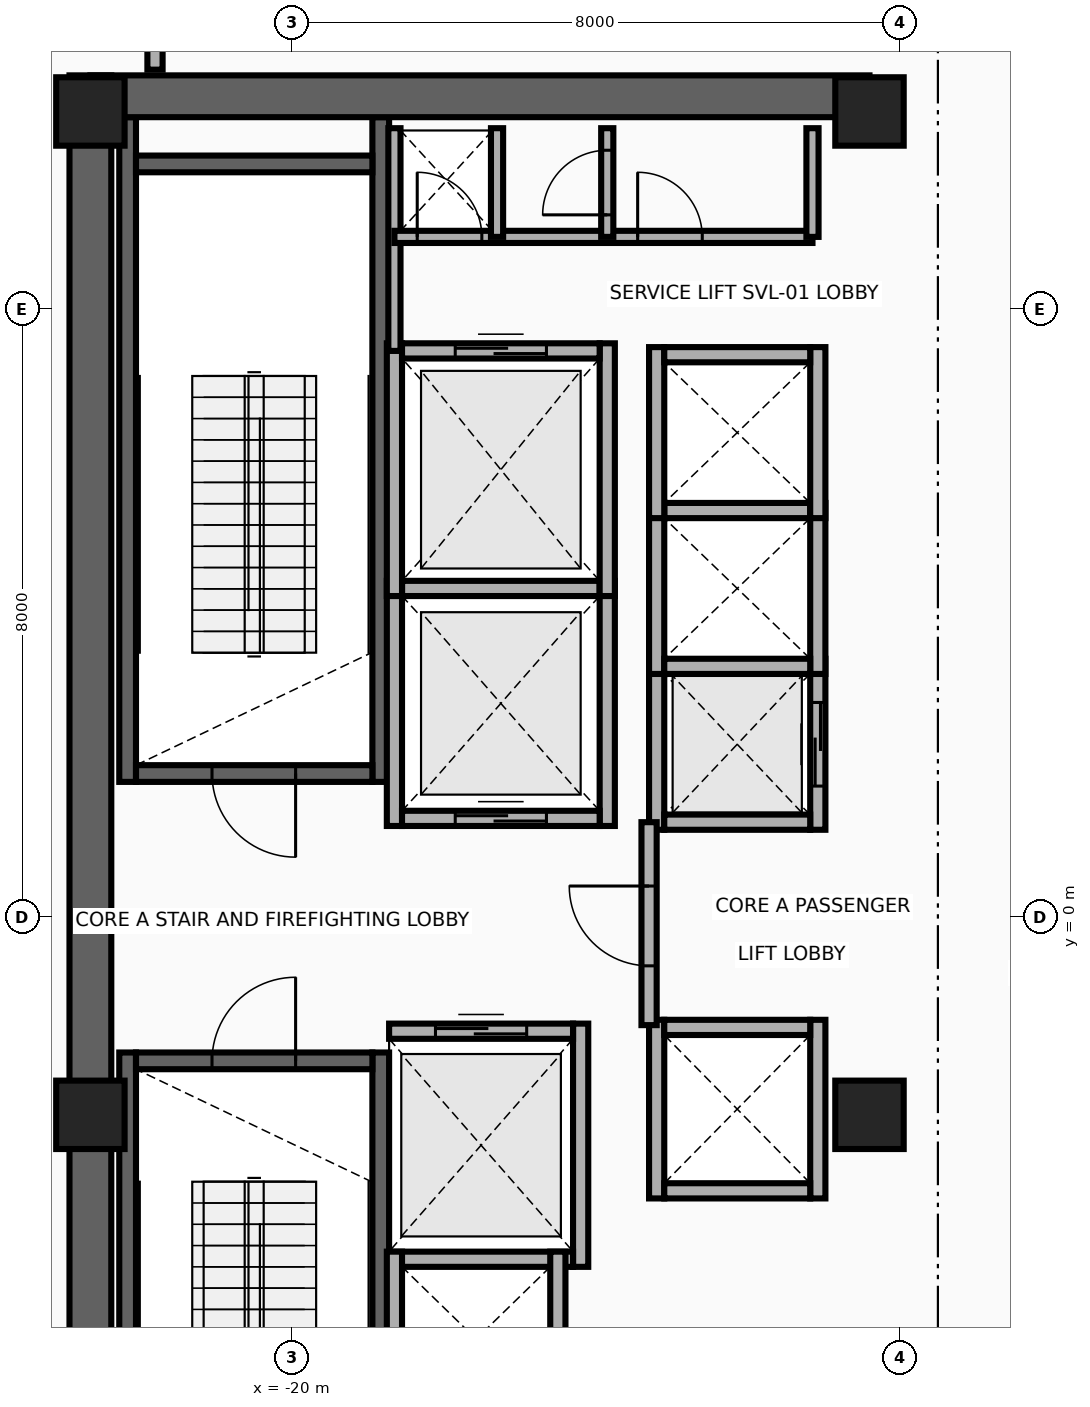
"""IFC4 building model, lengths in metres.
Left out: names, types, materials, properties, quantities, classifications, styles, units other than length and angle.
Written with IfcOpenShell. Run it as: python <this file> out.ifc"""

import sys

from ifc_helpers import new_model, si_unit, direction, frame, frame_2d, origin, origin_2d, place, context, subcontext, project, spatial, rectangle, extrude, source, transform, mapped, element, fill, save


model = new_model("IFC4")
c1 = context("Model", 3, precision=1e-05, world=origin(), true_north=direction((0.0, 1.0)))
c2 = subcontext(c1, "Body", "Model", "MODEL_VIEW")
j1 = project(units=[si_unit("LENGTHUNIT", "METRE"), si_unit("PLANEANGLEUNIT", "RADIAN")], contexts=[c1])
p1 = place(None, origin())
s1 = spatial("IfcSite", under=j1, at=p1, CompositionType="ELEMENT")
p2 = place(p1, origin())
s2 = spatial("IfcBuilding", under=s1, at=p2, CompositionType="ELEMENT")
p3 = place(p2, frame((0.0, 0.0, 196.3)))
s3 = spatial("IfcBuildingStorey", under=s2, at=p3, CompositionType="ELEMENT", Elevation=196.3)
for number, where, z_axis, x_axis in (
    (1, (-22.16, 1.78, 0.0), (0.0, 0.0, 1.0), (0.0, 1.0, 0.0)),
    (2, (-18.83, 1.78, 0.0), (0.0, 0.0, 1.0), (0.0, 1.0, 0.0)),
):
    element("IfcWall", number, at=place(p3, frame(where, z_axis=z_axis, x_axis=x_axis)), inside=s3, PredefinedType="SHEAR", context=c2, shape_type="SweptSolid", body=[
        extrude(rectangle(XDim=8.745, YDim=0.22, at=frame_2d((4.373, 0.0))), origin(), (0.0, 0.0, 1.0), 4.46),
    ])
p4 = place(p3, frame((-22.05, 1.89, 0.0), z_axis=(0.0, 0.0, 1.0), x_axis=(1.0, 0.0, 0.0)))
e3 = element("IfcWall", 3, at=p4, inside=s3, PredefinedType="SHEAR", context=c2, shape_type="SweptSolid", body=[
    extrude(rectangle(XDim=3.11, YDim=0.22, at=frame_2d((1.555, 0.0))), origin(), (0.0, 0.0, 1.0), 4.46),
])
p5 = place(p4, frame((1.0, 0.0, 0.0)))
e4 = element("IfcOpeningElement", 4, at=p5, cuts=e3, PredefinedType="OPENING", context=c2, shape_type="SweptSolid", body=[
    extrude(rectangle(XDim=1.1, YDim=2.15, at=frame_2d((0.55, 1.075))), frame((0.0, 0.125, 0.0), z_axis=(0.0, -1.0, 0.0), x_axis=(1.0, 0.0, 0.0)), (0.0, 0.0, 1.0), 0.25),
])
p6 = place(p3, frame((-22.05, 9.91, 0.0), z_axis=(0.0, 0.0, 1.0), x_axis=(1.0, 0.0, 0.0)))
e5 = element("IfcWall", 5, at=p6, inside=s3, PredefinedType="SHEAR", context=c2, shape_type="SweptSolid", body=[
    extrude(rectangle(XDim=3.11, YDim=0.22, at=frame_2d((1.555, 0.0))), origin(), (0.0, 0.0, 1.0), 4.46),
])
for number, where, z_axis, x_axis in (
    (6, (-22.16, -10.525, 0.0), (0.0, 0.0, 1.0), (0.0, 1.0, 0.0)),
    (7, (-18.83, -10.525, 0.0), (0.0, 0.0, 1.0), (0.0, 1.0, 0.0)),
):
    element("IfcWall", number, at=place(p3, frame(where, z_axis=z_axis, x_axis=x_axis)), inside=s3, PredefinedType="SHEAR", context=c2, shape_type="SweptSolid", body=[
        extrude(rectangle(XDim=8.745, YDim=0.22, at=frame_2d((4.373, 0.0))), origin(), (0.0, 0.0, 1.0), 4.46),
    ])
p7 = place(p3, frame((-22.05, -1.89, 0.0), z_axis=(0.0, 0.0, 1.0), x_axis=(1.0, 0.0, 0.0)))
e8 = element("IfcWall", 8, at=p7, inside=s3, PredefinedType="SHEAR", context=c2, shape_type="SweptSolid", body=[
    extrude(rectangle(XDim=3.11, YDim=0.22, at=frame_2d((1.555, 0.0))), origin(), (0.0, 0.0, 1.0), 4.46),
])
p8 = place(p7, frame((1.0, 0.0, 0.0)))
e9 = element("IfcOpeningElement", 9, at=p8, cuts=e8, PredefinedType="OPENING", context=c2, shape_type="SweptSolid", body=[
    extrude(rectangle(XDim=1.1, YDim=2.15, at=frame_2d((0.55, 1.075))), frame((0.0, 0.125, 0.0), z_axis=(0.0, -1.0, 0.0), x_axis=(1.0, 0.0, 0.0)), (0.0, 0.0, 1.0), 0.25),
])
p9 = place(p3, frame((-22.65, -11.075, 0.0), z_axis=(0.0, 0.0, 1.0), x_axis=(0.0, 1.0, 0.0)))
e10 = element("IfcWall", 10, at=p9, inside=s3, PredefinedType="SHEAR", context=c2, shape_type="SweptSolid", body=[
    extrude(rectangle(XDim=22.15, YDim=0.55, at=frame_2d((11.075, 0.0))), origin(), (0.0, 0.0, 1.0), 4.46),
])
p10 = place(p3, frame((-22.65, 10.8, 0.0), z_axis=(0.0, 0.0, 1.0), x_axis=(1.0, 0.0, 0.0)))
e11 = element("IfcWall", 11, at=p10, inside=s3, PredefinedType="SHEAR", context=c2, shape_type="SweptSolid", body=[
    extrude(rectangle(XDim=10.25, YDim=0.55, at=frame_2d((5.125, 0.0))), origin(), (0.0, 0.0, 1.0), 4.46),
])
m1 = source(origin(), c2, "Body", "SweptSolid", [
    extrude(rectangle(XDim=0.9, YDim=0.9, at=origin_2d()), origin(), (0.0, 0.0, 1.0), 4.7),
])
for number, where, z_axis, x_axis in (
    (12, (-22.65, -2.6, 0.0), (0.0, 0.0, 1.0), (1.0, 0.0, 0.0)),
    (13, (-12.4, -2.6, 0.0), (0.0, 0.0, 1.0), (1.0, 0.0, 0.0)),
    (14, (-22.65, 10.6, 0.0), (0.0, 0.0, 1.0), (1.0, 0.0, 0.0)),
    (15, (-12.4, 10.6, 0.0), (0.0, 0.0, 1.0), (1.0, 0.0, 0.0)),
):
    element("IfcColumn", number, at=place(p3, frame(where, z_axis=z_axis, x_axis=x_axis)), inside=s3, PredefinedType="COLUMN", context=c2, shape_type="MappedRepresentation", body=[
        mapped(m1, transform((0.0, 0.0, 0.0), x_axis=(1.0, 0.0, 0.0), y_axis=(0.0, 1.0, 0.0), z_axis=(0.0, 0.0, 1.0), scale=1.0)),
    ])
for number, where, z_axis, x_axis in (
    (16, (-18.65, 1.2, 0.0), (0.0, 0.0, 1.0), (0.0, 1.0, 0.0)),
    (17, (-15.85, 1.2, 0.0), (0.0, 0.0, 1.0), (0.0, 1.0, 0.0)),
):
    element("IfcWall", number, at=place(p3, frame(where, z_axis=z_axis, x_axis=x_axis)), inside=s3, PredefinedType="MOVABLE", context=c2, shape_type="SweptSolid", body=[
        extrude(rectangle(XDim=3.225, YDim=0.2, at=frame_2d((1.613, 0.0))), origin(), (0.0, 0.0, 1.0), 4.46),
    ])
p11 = place(p3, frame((-18.55, 1.3, 0.0), z_axis=(0.0, 0.0, 1.0), x_axis=(1.0, 0.0, 0.0)))
e18 = element("IfcWall", 18, at=p11, inside=s3, PredefinedType="MOVABLE", context=c2, shape_type="SweptSolid", body=[
    extrude(rectangle(XDim=2.6, YDim=0.2, at=frame_2d((1.3, 0.0))), origin(), (0.0, 0.0, 1.0), 4.46),
])
p12 = place(p11, frame((0.7, 0.0, 0.0)))
e19 = element("IfcOpeningElement", 19, at=p12, cuts=e18, PredefinedType="OPENING", context=c2, shape_type="SweptSolid", body=[
    extrude(rectangle(XDim=1.2, YDim=2.1, at=frame_2d((0.6, 1.05))), frame((0.0, 0.115, 0.0), z_axis=(0.0, -1.0, 0.0), x_axis=(1.0, 0.0, 0.0)), (0.0, 0.0, 1.0), 0.23),
])
p13 = place(p3, frame((-18.55, 4.325, 0.0), z_axis=(0.0, 0.0, 1.0), x_axis=(1.0, 0.0, 0.0)))
e20 = element("IfcWall", 20, at=p13, inside=s3, PredefinedType="MOVABLE", context=c2, shape_type="SweptSolid", body=[
    extrude(rectangle(XDim=2.6, YDim=0.2, at=frame_2d((1.3, 0.0))), origin(), (0.0, 0.0, 1.0), 4.46),
])
p14 = place(p3, frame((-16.2, -4.6, 0.0), z_axis=(0.0, 0.0, 1.0), x_axis=(0.0, 1.0, 0.0)))
e21 = element("IfcWall", 21, at=p14, inside=s3, PredefinedType="MOVABLE", context=c2, shape_type="SweptSolid", body=[
    extrude(rectangle(XDim=3.2, YDim=0.2, at=frame_2d((1.6, 0.0))), origin(), (0.0, 0.0, 1.0), 4.46),
])
p15 = place(p3, frame((-18.72, -4.5, 0.0), z_axis=(0.0, 0.0, 1.0), x_axis=(1.0, 0.0, 0.0)))
e22 = element("IfcWall", 22, at=p15, inside=s3, PredefinedType="MOVABLE", context=c2, shape_type="SweptSolid", body=[
    extrude(rectangle(XDim=2.42, YDim=0.2, at=frame_2d((1.21, 0.0))), origin(), (0.0, 0.0, 1.0), 4.46),
])
p16 = place(p3, frame((-18.72, -1.5, 0.0), z_axis=(0.0, 0.0, 1.0), x_axis=(1.0, 0.0, 0.0)))
e23 = element("IfcWall", 23, at=p16, inside=s3, PredefinedType="MOVABLE", context=c2, shape_type="SweptSolid", body=[
    extrude(rectangle(XDim=2.42, YDim=0.2, at=frame_2d((1.21, 0.0))), origin(), (0.0, 0.0, 1.0), 4.46),
])
p17 = place(p16, frame((0.61, 0.0, 0.0)))
e24 = element("IfcOpeningElement", 24, at=p17, cuts=e23, PredefinedType="OPENING", context=c2, shape_type="SweptSolid", body=[
    extrude(rectangle(XDim=1.2, YDim=2.1, at=frame_2d((0.6, 1.05))), frame((0.0, 0.115, 0.0), z_axis=(0.0, -1.0, 0.0), x_axis=(1.0, 0.0, 0.0)), (0.0, 0.0, 1.0), 0.23),
])
for number, where, z_axis, x_axis in (
    (25, (-18.65, 4.225, 0.0), (0.0, 0.0, 1.0), (0.0, 1.0, 0.0)),
    (26, (-15.85, 4.225, 0.0), (0.0, 0.0, 1.0), (0.0, 1.0, 0.0)),
):
    element("IfcWall", number, at=place(p3, frame(where, z_axis=z_axis, x_axis=x_axis)), inside=s3, PredefinedType="MOVABLE", context=c2, shape_type="SweptSolid", body=[
        extrude(rectangle(XDim=3.325, YDim=0.2, at=frame_2d((1.663, 0.0))), origin(), (0.0, 0.0, 1.0), 4.46),
    ])
p18 = place(p3, frame((-18.55, 7.45, 0.0), z_axis=(0.0, 0.0, 1.0), x_axis=(1.0, 0.0, 0.0)))
e27 = element("IfcWall", 27, at=p18, inside=s3, PredefinedType="MOVABLE", context=c2, shape_type="SweptSolid", body=[
    extrude(rectangle(XDim=2.6, YDim=0.2, at=frame_2d((1.3, 0.0))), origin(), (0.0, 0.0, 1.0), 4.46),
])
p19 = place(p18, frame((0.7, 0.0, 0.0)))
e28 = element("IfcOpeningElement", 28, at=p19, cuts=e27, PredefinedType="OPENING", context=c2, shape_type="SweptSolid", body=[
    extrude(rectangle(XDim=1.2, YDim=2.1, at=frame_2d((0.6, 1.05))), frame((0.0, 0.115, 0.0), z_axis=(0.0, -1.0, 0.0), x_axis=(1.0, 0.0, 0.0)), (0.0, 0.0, 1.0), 0.23),
])
p20 = place(p3, frame((-15.2, 1.15, 0.0), z_axis=(0.0, 0.0, 1.0), x_axis=(0.0, 1.0, 0.0)))
e29 = element("IfcWall", 29, at=p20, inside=s3, PredefinedType="MOVABLE", context=c2, shape_type="SweptSolid", body=[
    extrude(rectangle(XDim=2.25, YDim=0.2, at=frame_2d((1.125, 0.0))), origin(), (0.0, 0.0, 1.0), 4.46),
])
p21 = place(p3, frame((-13.08, 1.15, 0.0), z_axis=(0.0, 0.0, 1.0), x_axis=(0.0, 1.0, 0.0)))
e30 = element("IfcWall", 30, at=p21, inside=s3, PredefinedType="MOVABLE", context=c2, shape_type="SweptSolid", body=[
    extrude(rectangle(XDim=2.25, YDim=0.2, at=frame_2d((1.125, 0.0))), origin(), (0.0, 0.0, 1.0), 4.46),
])
p22 = place(p21, frame((0.575, 0.0, 0.0)))
e31 = element("IfcOpeningElement", 31, at=p22, cuts=e30, PredefinedType="OPENING", context=c2, shape_type="SweptSolid", body=[
    extrude(rectangle(XDim=1.1, YDim=2.1, at=frame_2d((0.55, 1.05))), frame((0.0, 0.115, 0.0), z_axis=(0.0, -1.0, 0.0), x_axis=(1.0, 0.0, 0.0)), (0.0, 0.0, 1.0), 0.23),
])
p23 = place(p3, frame((-15.1, 1.25, 0.0), z_axis=(0.0, 0.0, 1.0), x_axis=(1.0, 0.0, 0.0)))
e32 = element("IfcWall", 32, at=p23, inside=s3, PredefinedType="MOVABLE", context=c2, shape_type="SweptSolid", body=[
    extrude(rectangle(XDim=1.92, YDim=0.2, at=frame_2d((0.96, 0.0))), origin(), (0.0, 0.0, 1.0), 4.46),
])
for number, where, z_axis, x_axis in (
    (33, (-15.2, 3.2, 0.0), (0.0, 0.0, 1.0), (0.0, 1.0, 0.0)),
    (34, (-13.08, 3.2, 0.0), (0.0, 0.0, 1.0), (0.0, 1.0, 0.0)),
):
    element("IfcWall", number, at=place(p3, frame(where, z_axis=z_axis, x_axis=x_axis)), inside=s3, PredefinedType="MOVABLE", context=c2, shape_type="SweptSolid", body=[
        extrude(rectangle(XDim=2.25, YDim=0.2, at=frame_2d((1.125, 0.0))), origin(), (0.0, 0.0, 1.0), 4.46),
    ])
for number, where, z_axis, x_axis in (
    (35, (-15.1, 3.3, 0.0), (0.0, 0.0, 1.0), (1.0, 0.0, 0.0)),
    (36, (-15.1, 5.35, 0.0), (0.0, 0.0, 1.0), (1.0, 0.0, 0.0)),
):
    element("IfcWall", number, at=place(p3, frame(where, z_axis=z_axis, x_axis=x_axis)), inside=s3, PredefinedType="MOVABLE", context=c2, shape_type="SweptSolid", body=[
        extrude(rectangle(XDim=1.92, YDim=0.2, at=frame_2d((0.96, 0.0))), origin(), (0.0, 0.0, 1.0), 4.46),
    ])
for number, where, z_axis, x_axis in (
    (37, (-15.2, 5.25, 0.0), (0.0, 0.0, 1.0), (0.0, 1.0, 0.0)),
    (38, (-13.08, 5.25, 0.0), (0.0, 0.0, 1.0), (0.0, 1.0, 0.0)),
):
    element("IfcWall", number, at=place(p3, frame(where, z_axis=z_axis, x_axis=x_axis)), inside=s3, PredefinedType="MOVABLE", context=c2, shape_type="SweptSolid", body=[
        extrude(rectangle(XDim=2.25, YDim=0.2, at=frame_2d((1.125, 0.0))), origin(), (0.0, 0.0, 1.0), 4.46),
    ])
p24 = place(p3, frame((-15.1, 7.4, 0.0), z_axis=(0.0, 0.0, 1.0), x_axis=(1.0, 0.0, 0.0)))
e39 = element("IfcWall", 39, at=p24, inside=s3, PredefinedType="MOVABLE", context=c2, shape_type="SweptSolid", body=[
    extrude(rectangle(XDim=1.92, YDim=0.2, at=frame_2d((0.96, 0.0))), origin(), (0.0, 0.0, 1.0), 4.46),
])
for number, where, z_axis, x_axis in (
    (40, (-18.65, -6.7, 0.0), (0.0, 0.0, 1.0), (0.0, 1.0, 0.0)),
    (41, (-16.5, -6.7, 0.0), (0.0, 0.0, 1.0), (0.0, 1.0, 0.0)),
):
    element("IfcWall", number, at=place(p3, frame(where, z_axis=z_axis, x_axis=x_axis)), inside=s3, PredefinedType="MOVABLE", context=c2, shape_type="SweptSolid", body=[
        extrude(rectangle(XDim=2.3, YDim=0.2, at=frame_2d((1.15, 0.0))), origin(), (0.0, 0.0, 1.0), 4.46),
    ])
for number, where, z_axis, x_axis in (
    (42, (-15.2, -3.7, 0.0), (0.0, 0.0, 1.0), (0.0, 1.0, 0.0)),
    (43, (-13.08, -3.7, 0.0), (0.0, 0.0, 1.0), (0.0, 1.0, 0.0)),
):
    element("IfcWall", number, at=place(p3, frame(where, z_axis=z_axis, x_axis=x_axis)), inside=s3, PredefinedType="MOVABLE", context=c2, shape_type="SweptSolid", body=[
        extrude(rectangle(XDim=2.35, YDim=0.2, at=frame_2d((1.175, 0.0))), origin(), (0.0, 0.0, 1.0), 4.46),
    ])
for number, where, z_axis, x_axis in (
    (44, (-15.1, -3.6, 0.0), (0.0, 0.0, 1.0), (1.0, 0.0, 0.0)),
    (45, (-15.1, -1.45, 0.0), (0.0, 0.0, 1.0), (1.0, 0.0, 0.0)),
):
    element("IfcWall", number, at=place(p3, frame(where, z_axis=z_axis, x_axis=x_axis)), inside=s3, PredefinedType="MOVABLE", context=c2, shape_type="SweptSolid", body=[
        extrude(rectangle(XDim=1.92, YDim=0.2, at=frame_2d((0.96, 0.0))), origin(), (0.0, 0.0, 1.0), 4.46),
    ])
p25 = place(p3, frame((-15.3, -1.42, 0.0), z_axis=(0.0, 0.0, 1.0), x_axis=(0.0, 1.0, 0.0)))
e46 = element("IfcWall", 46, at=p25, inside=s3, PredefinedType="PARTITIONING", context=c2, shape_type="SweptSolid", body=[
    extrude(rectangle(XDim=2.67, YDim=0.2, at=frame_2d((1.335, 0.0))), origin(), (0.0, 0.0, 1.0), 4.46),
])
p26 = place(p25, frame((0.78, 0.0, 0.0)))
e47 = element("IfcOpeningElement", 47, at=p26, cuts=e46, PredefinedType="OPENING", context=c2, shape_type="SweptSolid", body=[
    extrude(rectangle(XDim=1.05, YDim=2.15, at=frame_2d((0.525, 1.075))), frame((0.0, 0.115, 0.0), z_axis=(0.0, -1.0, 0.0), x_axis=(1.0, 0.0, 0.0)), (0.0, 0.0, 1.0), 0.23),
])
p27 = place(p3, frame((-18.65, 7.45, 0.0), z_axis=(0.0, 0.0, 1.0), x_axis=(0.0, 1.0, 0.0)))
e48 = element("IfcWall", 48, at=p27, inside=s3, PredefinedType="PARTITIONING", context=c2, shape_type="SweptSolid", body=[
    extrude(rectangle(XDim=2.93, YDim=0.16, at=frame_2d((1.465, 0.0))), origin(), (0.0, 0.0, 1.0), 4.46),
])
p28 = place(p3, frame((-18.65, 8.95, 0.0), z_axis=(0.0, 0.0, 1.0), x_axis=(1.0, 0.0, 0.0)))
e49 = element("IfcWall", 49, at=p28, inside=s3, PredefinedType="PARTITIONING", context=c2, shape_type="SweptSolid", body=[
    extrude(rectangle(XDim=5.5, YDim=0.16, at=frame_2d((2.75, 0.0))), origin(), (0.0, 0.0, 1.0), 4.46),
])
p29 = place(p28, frame((0.3, 0.0, 0.0)))
e50 = element("IfcOpeningElement", 50, at=p29, cuts=e49, PredefinedType="OPENING", context=c2, shape_type="SweptSolid", body=[
    extrude(rectangle(XDim=0.85, YDim=2.05, at=frame_2d((0.425, 1.025))), frame((0.0, 0.095, 0.0), z_axis=(0.0, -1.0, 0.0), x_axis=(1.0, 0.0, 0.0)), (0.0, 0.0, 1.0), 0.19),
])
p30 = place(p28, frame((3.2, 0.0, 0.0)))
e51 = element("IfcOpeningElement", 51, at=p30, cuts=e49, PredefinedType="OPENING", context=c2, shape_type="SweptSolid", body=[
    extrude(rectangle(XDim=0.85, YDim=2.05, at=frame_2d((0.425, 1.025))), frame((0.0, 0.095, 0.0), z_axis=(0.0, -1.0, 0.0), x_axis=(1.0, 0.0, 0.0)), (0.0, 0.0, 1.0), 0.19),
])
for number, where, z_axis, x_axis in (
    (52, (-13.15, 8.95, 0.0), (0.0, 0.0, 1.0), (0.0, 1.0, 0.0)),
    (53, (-17.3, 8.95, 0.0), (0.0, 0.0, 1.0), (0.0, 1.0, 0.0)),
):
    element("IfcWall", number, at=place(p3, frame(where, z_axis=z_axis, x_axis=x_axis)), inside=s3, PredefinedType="PARTITIONING", context=c2, shape_type="SweptSolid", body=[
        extrude(rectangle(XDim=1.43, YDim=0.16, at=frame_2d((0.715, 0.0))), origin(), (0.0, 0.0, 1.0), 4.46),
    ])
p31 = place(p3, frame((-15.85, 8.95, 0.0), z_axis=(0.0, 0.0, 1.0), x_axis=(0.0, 1.0, 0.0)))
e54 = element("IfcWall", 54, at=p31, inside=s3, PredefinedType="PARTITIONING", context=c2, shape_type="SweptSolid", body=[
    extrude(rectangle(XDim=1.43, YDim=0.16, at=frame_2d((0.715, 0.0))), origin(), (0.0, 0.0, 1.0), 4.46),
])
p32 = place(p31, frame((0.29, 0.0, 0.0)))
e55 = element("IfcOpeningElement", 55, at=p32, cuts=e54, PredefinedType="OPENING", context=c2, shape_type="SweptSolid", body=[
    extrude(rectangle(XDim=0.85, YDim=2.05, at=frame_2d((0.425, 1.025))), frame((0.0, 0.095, 0.0), z_axis=(0.0, -1.0, 0.0), x_axis=(1.0, 0.0, 0.0)), (0.0, 0.0, 1.0), 0.19),
])
p33 = place(p3, frame((-21.8, 11.15, 0.0), z_axis=(0.0, 0.0, 1.0), x_axis=(0.0, 1.0, 0.0)))
e56 = element("IfcWall", 56, at=p33, inside=s3, PredefinedType="PARTITIONING", context=c2, shape_type="SweptSolid", body=[
    extrude(rectangle(XDim=4.35, YDim=0.2, at=frame_2d((2.175, 0.0))), origin(), (0.0, 0.0, 1.0), 3.744),
])
p34 = place(p12, origin())
e57 = element("IfcDoor", 57, at=p34, inside=s3, OperationType="DOUBLE_DOOR_SLIDING", PredefinedType="DOOR", context=c2, shape_type="SweptSolid", body=[
    extrude(rectangle(XDim=1.2, YDim=2.1, at=frame_2d((0.6, 1.05))), frame((0.0, 0.025, 0.0), z_axis=(0.0, -1.0, 0.0), x_axis=(1.0, 0.0, 0.0)), (0.0, 0.0, 1.0), 0.05),
])
fill(e19, e57)
p35 = place(p17, origin())
e58 = element("IfcDoor", 58, at=p35, inside=s3, OperationType="DOUBLE_DOOR_SLIDING", PredefinedType="DOOR", context=c2, shape_type="SweptSolid", body=[
    extrude(rectangle(XDim=1.2, YDim=2.1, at=frame_2d((0.6, 1.05))), frame((0.0, 0.025, 0.0), z_axis=(0.0, -1.0, 0.0), x_axis=(1.0, 0.0, 0.0)), (0.0, 0.0, 1.0), 0.05),
])
fill(e24, e58)
p36 = place(p19, origin())
e59 = element("IfcDoor", 59, at=p36, inside=s3, OperationType="DOUBLE_DOOR_SLIDING", PredefinedType="DOOR", context=c2, shape_type="SweptSolid", body=[
    extrude(rectangle(XDim=1.2, YDim=2.1, at=frame_2d((0.6, 1.05))), frame((0.0, 0.025, 0.0), z_axis=(0.0, -1.0, 0.0), x_axis=(1.0, 0.0, 0.0)), (0.0, 0.0, 1.0), 0.05),
])
fill(e28, e59)
p37 = place(p22, origin())
e60 = element("IfcDoor", 60, at=p37, inside=s3, OperationType="DOUBLE_DOOR_SLIDING", PredefinedType="DOOR", context=c2, shape_type="SweptSolid", body=[
    extrude(rectangle(XDim=1.1, YDim=2.1, at=frame_2d((0.55, 1.05))), frame((0.0, 0.025, 0.0), z_axis=(0.0, -1.0, 0.0), x_axis=(1.0, 0.0, 0.0)), (0.0, 0.0, 1.0), 0.05),
])
fill(e31, e60)
p38 = place(p26, origin())
e61 = element("IfcDoor", 61, at=p38, inside=s3, OperationType="SINGLE_SWING_RIGHT", PredefinedType="DOOR", context=c2, shape_type="SweptSolid", body=[
    extrude(rectangle(XDim=1.05, YDim=2.15, at=frame_2d((0.525, 1.075))), frame((0.0, 0.025, 0.0), z_axis=(0.0, -1.0, 0.0), x_axis=(1.0, 0.0, 0.0)), (0.0, 0.0, 1.0), 0.05),
])
fill(e47, e61)
p39 = place(p5, frame((1.1, 0.0, 0.0), z_axis=(0.0, 0.0, 1.0), x_axis=(-1.0, 0.0, 0.0)))
e62 = element("IfcDoor", 62, at=p39, inside=s3, OperationType="SINGLE_SWING_LEFT", PredefinedType="DOOR", context=c2, shape_type="SweptSolid", body=[
    extrude(rectangle(XDim=1.1, YDim=2.15, at=frame_2d((0.55, 1.075))), frame((0.0, 0.025, 0.0), z_axis=(0.0, -1.0, 0.0), x_axis=(1.0, 0.0, 0.0)), (0.0, 0.0, 1.0), 0.05),
])
fill(e4, e62)
p40 = place(p8, origin())
e63 = element("IfcDoor", 63, at=p40, inside=s3, OperationType="SINGLE_SWING_RIGHT", PredefinedType="DOOR", context=c2, shape_type="SweptSolid", body=[
    extrude(rectangle(XDim=1.1, YDim=2.15, at=frame_2d((0.55, 1.075))), frame((0.0, 0.025, 0.0), z_axis=(0.0, -1.0, 0.0), x_axis=(1.0, 0.0, 0.0)), (0.0, 0.0, 1.0), 0.05),
])
fill(e9, e63)
p41 = place(p29, origin())
e64 = element("IfcDoor", 64, at=p41, inside=s3, OperationType="SINGLE_SWING_LEFT", PredefinedType="DOOR", context=c2, shape_type="SweptSolid", body=[
    extrude(rectangle(XDim=0.85, YDim=2.05, at=frame_2d((0.425, 1.025))), frame((0.0, 0.025, 0.0), z_axis=(0.0, -1.0, 0.0), x_axis=(1.0, 0.0, 0.0)), (0.0, 0.0, 1.0), 0.05),
])
fill(e50, e64)
p42 = place(p30, origin())
e65 = element("IfcDoor", 65, at=p42, inside=s3, OperationType="SINGLE_SWING_RIGHT", PredefinedType="DOOR", context=c2, shape_type="SweptSolid", body=[
    extrude(rectangle(XDim=0.85, YDim=2.05, at=frame_2d((0.425, 1.025))), frame((0.0, 0.025, 0.0), z_axis=(0.0, -1.0, 0.0), x_axis=(1.0, 0.0, 0.0)), (0.0, 0.0, 1.0), 0.05),
])
fill(e51, e65)
p43 = place(p32, origin())
e66 = element("IfcDoor", 66, at=p43, inside=s3, OperationType="SINGLE_SWING_LEFT", PredefinedType="DOOR", context=c2, shape_type="SweptSolid", body=[
    extrude(rectangle(XDim=0.85, YDim=2.05, at=frame_2d((0.425, 1.025))), frame((0.0, 0.025, 0.0), z_axis=(0.0, -1.0, 0.0), x_axis=(1.0, 0.0, 0.0)), (0.0, 0.0, 1.0), 0.05),
])
fill(e55, e66)
save(model, sys.argv[1])
